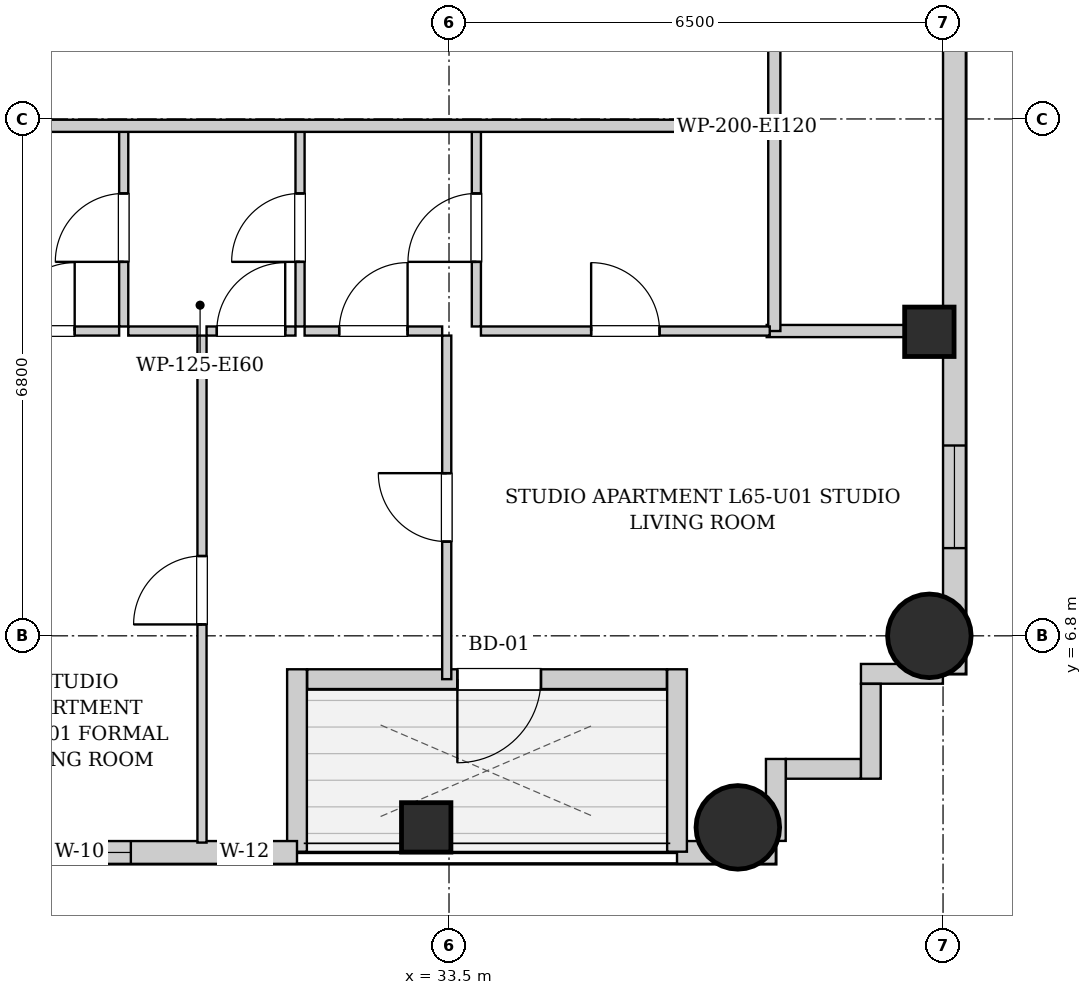
"""IFC4 building model, lengths in metres.
Left out: names, types, materials, properties, quantities, classifications, styles, units other than length and angle.
Written with IfcOpenShell. Run it as: python <this file> out.ifc"""

import sys

from ifc_helpers import new_model, si_unit, direction, frame, frame_2d, origin, origin_2d, place, context, subcontext, project, spatial, rectangle, circle, extrude, element, fill, save


model = new_model("IFC4")
c1 = context("Model", 3, precision=1e-05, world=origin(), true_north=direction((0.0, 1.0)))
c2 = subcontext(c1, "Body", "Model", "MODEL_VIEW")
j1 = project(units=[si_unit("LENGTHUNIT", "METRE"), si_unit("PLANEANGLEUNIT", "RADIAN")], contexts=[c1])
p1 = place(None, origin())
s1 = spatial("IfcSite", under=j1, at=p1, CompositionType="ELEMENT")
p2 = place(p1, origin())
s2 = spatial("IfcBuilding", under=s1, at=p2, CompositionType="ELEMENT")
p3 = place(p2, frame((0.0, 0.0, 224.1)))
s3 = spatial("IfcBuildingStorey", under=s2, at=p3, CompositionType="ELEMENT", Elevation=224.1)
p4 = place(p3, frame((33.2, 4.28, 0.0), z_axis=(0.0, 0.0, 1.0), x_axis=(1.0, 0.0, 0.0)))
e1 = element("IfcColumn", 1, at=p4, inside=s3, PredefinedType="COLUMN", context=c2, shape_type="SweptSolid", body=[
    extrude(rectangle(XDim=0.65, YDim=0.65, at=origin_2d()), origin(), (0.0, 0.0, 1.0), 3.4),
])
for number, where, z_axis, x_axis in (
    (2, (37.3, 4.28, 0.0), (0.0, 0.0, 1.0), (1.0, 0.0, 0.0)),
    (3, (39.82, 6.8, 0.0), (0.0, 0.0, 1.0), (1.0, 0.0, 0.0)),
):
    element("IfcColumn", number, at=place(p3, frame(where, z_axis=z_axis, x_axis=x_axis)), inside=s3, PredefinedType="COLUMN", context=c2, shape_type="SweptSolid", body=[
        extrude(circle(Radius=0.55, at=origin_2d()), origin(), (0.0, 0.0, 1.0), 3.4),
    ])
p5 = place(p3, frame((39.82, 10.8, 0.0), z_axis=(0.0, 0.0, 1.0), x_axis=(1.0, 0.0, 0.0)))
e4 = element("IfcColumn", 4, at=p5, inside=s3, PredefinedType="COLUMN", context=c2, shape_type="SweptSolid", body=[
    extrude(rectangle(XDim=0.65, YDim=0.65, at=origin_2d()), origin(), (0.0, 0.0, 1.0), 3.4),
])
p6 = place(p3, frame((40.15, 37.7, 0.0), z_axis=(0.0, 0.0, 1.0), x_axis=(0.0, -1.0, 0.0)))
e5 = element("IfcWall", 5, at=p6, inside=s3, PredefinedType="SOLIDWALL", context=c2, shape_type="SweptSolid", body=[
    extrude(rectangle(XDim=31.4, YDim=0.3, at=frame_2d((15.7, 0.0))), origin(), (0.0, 0.0, 1.0), 3.14),
])
p7 = place(p6, frame((28.396, 0.0, 0.55)))
e6 = element("IfcOpeningElement", 6, at=p7, cuts=e5, PredefinedType="OPENING", context=c2, shape_type="SweptSolid", body=[
    extrude(rectangle(XDim=1.35, YDim=1.2, at=frame_2d((0.675, 0.6))), frame((0.0, 0.16, 0.0), z_axis=(0.0, -1.0, 0.0), x_axis=(1.0, 0.0, 0.0)), (0.0, 0.0, 1.0), 0.32),
])
p8 = place(p6, frame((1.653, 0.0, 0.55)))
e7 = element("IfcOpeningElement", 7, at=p8, cuts=e5, PredefinedType="OPENING", context=c2, shape_type="SweptSolid", body=[
    extrude(rectangle(XDim=1.35, YDim=1.2, at=frame_2d((0.675, 0.6))), frame((0.0, 0.16, 0.0), z_axis=(0.0, -1.0, 0.0), x_axis=(1.0, 0.0, 0.0)), (0.0, 0.0, 1.0), 0.32),
])
p9 = place(p6, frame((19.683, 0.0, 0.55)))
e8 = element("IfcOpeningElement", 8, at=p9, cuts=e5, PredefinedType="OPENING", context=c2, shape_type="SweptSolid", body=[
    extrude(rectangle(XDim=1.35, YDim=1.2, at=frame_2d((0.675, 0.6))), frame((0.0, 0.16, 0.0), z_axis=(0.0, -1.0, 0.0), x_axis=(1.0, 0.0, 0.0)), (0.0, 0.0, 1.0), 0.32),
])
p10 = place(p6, frame((10.367, 0.0, 0.55)))
e9 = element("IfcOpeningElement", 9, at=p10, cuts=e5, PredefinedType="OPENING", context=c2, shape_type="SweptSolid", body=[
    extrude(rectangle(XDim=1.35, YDim=1.2, at=frame_2d((0.675, 0.6))), frame((0.0, 0.16, 0.0), z_axis=(0.0, -1.0, 0.0), x_axis=(1.0, 0.0, 0.0)), (0.0, 0.0, 1.0), 0.32),
])
p11 = place(p3, frame((37.8, 3.95, 0.0), z_axis=(0.0, 0.0, 1.0), x_axis=(-1.0, 0.0, 0.0)))
e10 = element("IfcWall", 10, at=p11, inside=s3, PredefinedType="SOLIDWALL", context=c2, shape_type="SweptSolid", body=[
    extrude(rectangle(XDim=1.3, YDim=0.3, at=frame_2d((0.65, 0.0))), origin(), (0.0, 0.0, 1.0), 3.14),
])
p12 = place(p3, frame((36.5, 3.96, 0.0), z_axis=(0.0, 0.0, 1.0), x_axis=(0.0, 1.0, 0.0)))
e11 = element("IfcWall", 11, at=p12, inside=s3, PredefinedType="SOLIDWALL", context=c2, shape_type="SweptSolid", body=[
    extrude(rectangle(XDim=2.4, YDim=0.26, at=frame_2d((1.2, 0.0))), origin(), (0.0, 0.0, 1.0), 3.14),
])
p13 = place(p3, frame((36.366, 6.23, 0.0), z_axis=(0.0, 0.0, 1.0), x_axis=(-1.0, 0.0, 0.0)))
e12 = element("IfcWall", 12, at=p13, inside=s3, PredefinedType="SOLIDWALL", context=c2, shape_type="SweptSolid", body=[
    extrude(rectangle(XDim=4.732, YDim=0.26, at=frame_2d((2.366, 0.0))), origin(), (0.0, 0.0, 1.0), 3.14),
])
p14 = place(p13, frame((1.656, 0.0, 0.0)))
e13 = element("IfcOpeningElement", 13, at=p14, cuts=e12, PredefinedType="OPENING", context=c2, shape_type="SweptSolid", body=[
    extrude(rectangle(XDim=1.1, YDim=2.0, at=frame_2d((0.55, 1.0))), frame((0.0, 0.14, 0.0), z_axis=(0.0, -1.0, 0.0), x_axis=(1.0, 0.0, 0.0)), (0.0, 0.0, 1.0), 0.28),
])
p15 = place(p3, frame((31.5, 6.36, 0.0), z_axis=(0.0, 0.0, 1.0), x_axis=(0.0, -1.0, 0.0)))
e14 = element("IfcWall", 14, at=p15, inside=s3, PredefinedType="SOLIDWALL", context=c2, shape_type="SweptSolid", body=[
    extrude(rectangle(XDim=2.4, YDim=0.26, at=frame_2d((1.2, 0.0))), origin(), (0.0, 0.0, 1.0), 3.14),
])
p16 = place(p3, frame((31.5, 3.95, 0.0), z_axis=(0.0, 0.0, 1.0), x_axis=(-1.0, 0.0, 0.0)))
e15 = element("IfcWall", 15, at=p16, inside=s3, PredefinedType="SOLIDWALL", context=c2, shape_type="SweptSolid", body=[
    extrude(rectangle(XDim=12.5, YDim=0.3, at=frame_2d((6.25, 0.0))), origin(), (0.0, 0.0, 1.0), 3.14),
])
p17 = place(p16, frame((11.171, 0.0, 0.55)))
e16 = element("IfcOpeningElement", 16, at=p17, cuts=e15, PredefinedType="OPENING", context=c2, shape_type="SweptSolid", body=[
    extrude(rectangle(XDim=0.85, YDim=1.2, at=frame_2d((0.425, 0.6))), frame((0.0, 0.16, 0.0), z_axis=(0.0, -1.0, 0.0), x_axis=(1.0, 0.0, 0.0)), (0.0, 0.0, 1.0), 0.32),
])
p18 = place(p16, frame((9.0, 0.0, 0.55)))
e17 = element("IfcOpeningElement", 17, at=p18, cuts=e15, PredefinedType="OPENING", context=c2, shape_type="SweptSolid", body=[
    extrude(rectangle(XDim=1.35, YDim=1.2, at=frame_2d((0.675, 0.6))), frame((0.0, 0.16, 0.0), z_axis=(0.0, -1.0, 0.0), x_axis=(1.0, 0.0, 0.0)), (0.0, 0.0, 1.0), 0.32),
])
p19 = place(p16, frame((2.186, 0.0, 0.55)))
e18 = element("IfcOpeningElement", 18, at=p19, cuts=e15, PredefinedType="OPENING", context=c2, shape_type="SweptSolid", body=[
    extrude(rectangle(XDim=1.35, YDim=1.2, at=frame_2d((0.675, 0.6))), frame((0.0, 0.16, 0.0), z_axis=(0.0, -1.0, 0.0), x_axis=(1.0, 0.0, 0.0)), (0.0, 0.0, 1.0), 0.32),
])
p20 = place(p16, frame((0.35, 0.0, 0.55)))
e19 = element("IfcOpeningElement", 19, at=p20, cuts=e15, PredefinedType="OPENING", context=c2, shape_type="SweptSolid", body=[
    extrude(rectangle(XDim=0.68, YDim=1.2, at=frame_2d((0.34, 0.6))), frame((0.0, 0.16, 0.0), z_axis=(0.0, -1.0, 0.0), x_axis=(1.0, 0.0, 0.0)), (0.0, 0.0, 1.0), 0.32),
])
p21 = place(p3, frame((39.998, 6.3, 0.0), z_axis=(0.0, 0.0, 1.0), x_axis=(-1.0, 0.0, 0.0)))
e20 = element("IfcWall", 20, at=p21, inside=s3, PredefinedType="SOLIDWALL", context=c2, shape_type="SweptSolid", body=[
    extrude(rectangle(XDim=1.078, YDim=0.26, at=frame_2d((0.539, 0.0))), origin(), (0.0, 0.0, 1.0), 3.14),
])
p22 = place(p3, frame((39.05, 6.168, 0.0), z_axis=(0.0, 0.0, 1.0), x_axis=(0.0, -1.0, 0.0)))
e21 = element("IfcWall", 21, at=p22, inside=s3, PredefinedType="SOLIDWALL", context=c2, shape_type="SweptSolid", body=[
    extrude(rectangle(XDim=1.248, YDim=0.26, at=frame_2d((0.624, 0.0))), origin(), (0.0, 0.0, 1.0), 3.14),
])
p23 = place(p3, frame((38.918, 5.05, 0.0), z_axis=(0.0, 0.0, 1.0), x_axis=(-1.0, 0.0, 0.0)))
e22 = element("IfcWall", 22, at=p23, inside=s3, PredefinedType="SOLIDWALL", context=c2, shape_type="SweptSolid", body=[
    extrude(rectangle(XDim=0.986, YDim=0.26, at=frame_2d((0.493, 0.0))), origin(), (0.0, 0.0, 1.0), 3.14),
])
p24 = place(p3, frame((37.8, 5.18, 0.0), z_axis=(0.0, 0.0, 1.0), x_axis=(0.0, -1.0, 0.0)))
e23 = element("IfcWall", 23, at=p24, inside=s3, PredefinedType="SOLIDWALL", context=c2, shape_type="SweptSolid", body=[
    extrude(rectangle(XDim=1.078, YDim=0.26, at=frame_2d((0.539, 0.0))), origin(), (0.0, 0.0, 1.0), 3.14),
])
p25 = place(p3, frame((37.78, 13.51, 0.0), z_axis=(0.0, 0.0, 1.0), x_axis=(0.0, 1.0, 0.0)))
e24 = element("IfcWall", 24, at=p25, inside=s3, PredefinedType="PARTITIONING", context=c2, shape_type="SweptSolid", body=[
    extrude(rectangle(XDim=1.58, YDim=0.16, at=frame_2d((0.79, 0.0))), origin(), (0.0, 0.0, 1.0), 3.14),
])
p26 = place(p3, frame((37.68, 10.81, 0.0), z_axis=(0.0, 0.0, 1.0), x_axis=(1.0, 0.0, 0.0)))
e25 = element("IfcWall", 25, at=p26, inside=s3, PredefinedType="PARTITIONING", context=c2, shape_type="SweptSolid", body=[
    extrude(rectangle(XDim=2.34, YDim=0.16, at=frame_2d((1.17, 0.0))), origin(), (0.0, 0.0, 1.0), 3.14),
])
p27 = place(p3, frame((37.78, 10.81, 0.0), z_axis=(0.0, 0.0, 1.0), x_axis=(0.0, 1.0, 0.0)))
e26 = element("IfcWall", 26, at=p27, inside=s3, PredefinedType="PARTITIONING", context=c2, shape_type="SweptSolid", body=[
    extrude(rectangle(XDim=2.66, YDim=0.16, at=frame_2d((1.33, 0.0))), origin(), (0.0, 0.0, 1.0), 3.14),
])
p28 = place(p3, frame((29.22, 10.87, 0.0), z_axis=(0.0, 0.0, 1.0), x_axis=(0.0, 1.0, 0.0)))
e27 = element("IfcWall", 27, at=p28, inside=s3, PredefinedType="PARTITIONING", context=c2, shape_type="SweptSolid", body=[
    extrude(rectangle(XDim=2.6, YDim=0.12, at=frame_2d((1.3, 0.0))), origin(), (0.0, 0.0, 1.0), 3.14),
])
p29 = place(p28, frame((0.85, 0.0, 0.0)))
e28 = element("IfcOpeningElement", 28, at=p29, cuts=e27, PredefinedType="OPENING", context=c2, shape_type="SweptSolid", body=[
    extrude(rectangle(XDim=0.9, YDim=2.05, at=frame_2d((0.45, 1.025))), frame((0.0, 0.07, 0.0), z_axis=(0.0, -1.0, 0.0), x_axis=(1.0, 0.0, 0.0)), (0.0, 0.0, 1.0), 0.14),
])
p30 = place(p3, frame((27.09, 10.81, 0.0), z_axis=(0.0, 0.0, 1.0), x_axis=(1.0, 0.0, 0.0)))
e29 = element("IfcWall", 29, at=p30, inside=s3, PredefinedType="PARTITIONING", context=c2, shape_type="SweptSolid", body=[
    extrude(rectangle(XDim=2.07, YDim=0.12, at=frame_2d((1.035, 0.0))), origin(), (0.0, 0.0, 1.0), 3.14),
])
p31 = place(p30, frame((0.585, 0.0, 0.0)))
e30 = element("IfcOpeningElement", 30, at=p31, cuts=e29, PredefinedType="OPENING", context=c2, shape_type="SweptSolid", body=[
    extrude(rectangle(XDim=0.9, YDim=2.05, at=frame_2d((0.45, 1.025))), frame((0.0, 0.07, 0.0), z_axis=(0.0, -1.0, 0.0), x_axis=(1.0, 0.0, 0.0)), (0.0, 0.0, 1.0), 0.14),
])
p32 = place(p3, frame((31.54, 10.87, 0.0), z_axis=(0.0, 0.0, 1.0), x_axis=(0.0, 1.0, 0.0)))
e31 = element("IfcWall", 31, at=p32, inside=s3, PredefinedType="PARTITIONING", context=c2, shape_type="SweptSolid", body=[
    extrude(rectangle(XDim=2.6, YDim=0.12, at=frame_2d((1.3, 0.0))), origin(), (0.0, 0.0, 1.0), 3.14),
])
p33 = place(p32, frame((0.85, 0.0, 0.0)))
e32 = element("IfcOpeningElement", 32, at=p33, cuts=e31, PredefinedType="OPENING", context=c2, shape_type="SweptSolid", body=[
    extrude(rectangle(XDim=0.9, YDim=2.05, at=frame_2d((0.45, 1.025))), frame((0.0, 0.07, 0.0), z_axis=(0.0, -1.0, 0.0), x_axis=(1.0, 0.0, 0.0)), (0.0, 0.0, 1.0), 0.14),
])
p34 = place(p3, frame((29.28, 10.81, 0.0), z_axis=(0.0, 0.0, 1.0), x_axis=(1.0, 0.0, 0.0)))
e33 = element("IfcWall", 33, at=p34, inside=s3, PredefinedType="PARTITIONING", context=c2, shape_type="SweptSolid", body=[
    extrude(rectangle(XDim=0.91, YDim=0.12, at=frame_2d((0.455, 0.0))), origin(), (0.0, 0.0, 1.0), 3.14),
])
p35 = place(p3, frame((30.31, 10.81, 0.0), z_axis=(0.0, 0.0, 1.0), x_axis=(1.0, 0.0, 0.0)))
e34 = element("IfcWall", 34, at=p35, inside=s3, PredefinedType="PARTITIONING", context=c2, shape_type="SweptSolid", body=[
    extrude(rectangle(XDim=1.17, YDim=0.12, at=frame_2d((0.585, 0.0))), origin(), (0.0, 0.0, 1.0), 3.14),
])
p36 = place(p35, frame((0.135, 0.0, 0.0)))
e35 = element("IfcOpeningElement", 35, at=p36, cuts=e34, PredefinedType="OPENING", context=c2, shape_type="SweptSolid", body=[
    extrude(rectangle(XDim=0.9, YDim=2.05, at=frame_2d((0.45, 1.025))), frame((0.0, 0.07, 0.0), z_axis=(0.0, -1.0, 0.0), x_axis=(1.0, 0.0, 0.0)), (0.0, 0.0, 1.0), 0.14),
])
p37 = place(p3, frame((33.86, 10.87, 0.0), z_axis=(0.0, 0.0, 1.0), x_axis=(0.0, 1.0, 0.0)))
e36 = element("IfcWall", 36, at=p37, inside=s3, PredefinedType="PARTITIONING", context=c2, shape_type="SweptSolid", body=[
    extrude(rectangle(XDim=2.6, YDim=0.12, at=frame_2d((1.3, 0.0))), origin(), (0.0, 0.0, 1.0), 3.14),
])
p38 = place(p37, frame((0.85, 0.0, 0.0)))
e37 = element("IfcOpeningElement", 37, at=p38, cuts=e36, PredefinedType="OPENING", context=c2, shape_type="SweptSolid", body=[
    extrude(rectangle(XDim=0.9, YDim=2.05, at=frame_2d((0.45, 1.025))), frame((0.0, 0.07, 0.0), z_axis=(0.0, -1.0, 0.0), x_axis=(1.0, 0.0, 0.0)), (0.0, 0.0, 1.0), 0.14),
])
p39 = place(p3, frame((31.6, 10.81, 0.0), z_axis=(0.0, 0.0, 1.0), x_axis=(1.0, 0.0, 0.0)))
e38 = element("IfcWall", 38, at=p39, inside=s3, PredefinedType="PARTITIONING", context=c2, shape_type="SweptSolid", body=[
    extrude(rectangle(XDim=1.81, YDim=0.12, at=frame_2d((0.905, 0.0))), origin(), (0.0, 0.0, 1.0), 3.14),
])
p40 = place(p39, frame((0.455, 0.0, 0.0)))
e39 = element("IfcOpeningElement", 39, at=p40, cuts=e38, PredefinedType="OPENING", context=c2, shape_type="SweptSolid", body=[
    extrude(rectangle(XDim=0.9, YDim=2.05, at=frame_2d((0.45, 1.025))), frame((0.0, 0.07, 0.0), z_axis=(0.0, -1.0, 0.0), x_axis=(1.0, 0.0, 0.0)), (0.0, 0.0, 1.0), 0.14),
])
p41 = place(p3, frame((33.92, 10.81, 0.0), z_axis=(0.0, 0.0, 1.0), x_axis=(1.0, 0.0, 0.0)))
e40 = element("IfcWall", 40, at=p41, inside=s3, PredefinedType="PARTITIONING", context=c2, shape_type="SweptSolid", body=[
    extrude(rectangle(XDim=3.8, YDim=0.12, at=frame_2d((1.9, 0.0))), origin(), (0.0, 0.0, 1.0), 3.14),
])
p42 = place(p41, frame((1.45, 0.0, 0.0)))
e41 = element("IfcOpeningElement", 41, at=p42, cuts=e40, PredefinedType="OPENING", context=c2, shape_type="SweptSolid", body=[
    extrude(rectangle(XDim=0.9, YDim=2.05, at=frame_2d((0.45, 1.025))), frame((0.0, 0.07, 0.0), z_axis=(0.0, -1.0, 0.0), x_axis=(1.0, 0.0, 0.0)), (0.0, 0.0, 1.0), 0.14),
])
p43 = place(p3, frame((30.25, 4.08, 0.0), z_axis=(0.0, 0.0, 1.0), x_axis=(0.0, 1.0, 0.0)))
e42 = element("IfcWall", 42, at=p43, inside=s3, PredefinedType="PARTITIONING", context=c2, shape_type="SweptSolid", body=[
    extrude(rectangle(XDim=6.67, YDim=0.12, at=frame_2d((3.335, 0.0))), origin(), (0.0, 0.0, 1.0), 3.14),
])
p44 = place(p43, frame((2.87, 0.0, 0.0)))
e43 = element("IfcOpeningElement", 43, at=p44, cuts=e42, PredefinedType="OPENING", context=c2, shape_type="SweptSolid", body=[
    extrude(rectangle(XDim=0.9, YDim=2.05, at=frame_2d((0.45, 1.025))), frame((0.0, 0.07, 0.0), z_axis=(0.0, -1.0, 0.0), x_axis=(1.0, 0.0, 0.0)), (0.0, 0.0, 1.0), 0.14),
])
p45 = place(p3, frame((33.47, 6.23, 0.0), z_axis=(0.0, 0.0, 1.0), x_axis=(0.0, 1.0, 0.0)))
e44 = element("IfcWall", 44, at=p45, inside=s3, PredefinedType="PARTITIONING", context=c2, shape_type="SweptSolid", body=[
    extrude(rectangle(XDim=4.52, YDim=0.12, at=frame_2d((2.26, 0.0))), origin(), (0.0, 0.0, 1.0), 3.14),
])
p46 = place(p45, frame((1.81, 0.0, 0.0)))
e45 = element("IfcOpeningElement", 45, at=p46, cuts=e44, PredefinedType="OPENING", context=c2, shape_type="SweptSolid", body=[
    extrude(rectangle(XDim=0.9, YDim=2.05, at=frame_2d((0.45, 1.025))), frame((0.0, 0.07, 0.0), z_axis=(0.0, -1.0, 0.0), x_axis=(1.0, 0.0, 0.0)), (0.0, 0.0, 1.0), 0.14),
])
p47 = place(p3, frame((13.15, 13.51, 0.0), z_axis=(0.0, 0.0, 1.0), x_axis=(1.0, 0.0, 0.0)))
e46 = element("IfcWall", 46, at=p47, inside=s3, PredefinedType="PARTITIONING", context=c2, shape_type="SweptSolid", body=[
    extrude(rectangle(XDim=24.6, YDim=0.16, at=frame_2d((12.3, 0.0))), origin(), (0.0, 0.0, 1.0), 3.14),
])
p48 = place(p47, frame((3.165, 0.0, 0.0)))
e47 = element("IfcOpeningElement", 47, at=p48, cuts=e46, PredefinedType="OPENING", context=c2, shape_type="SweptSolid", body=[
    extrude(rectangle(XDim=0.95, YDim=2.1, at=frame_2d((0.475, 1.05))), frame((0.0, 0.09, 0.0), z_axis=(0.0, -1.0, 0.0), x_axis=(1.0, 0.0, 0.0)), (0.0, 0.0, 1.0), 0.18),
])
p49 = place(p29, origin())
e48 = element("IfcDoor", 48, at=p49, inside=s3, OperationType="SINGLE_SWING_LEFT", PredefinedType="DOOR", context=c2, shape_type="SweptSolid", body=[
    extrude(rectangle(XDim=0.9, YDim=2.05, at=frame_2d((0.45, 1.025))), frame((0.0, 0.025, 0.0), z_axis=(0.0, -1.0, 0.0), x_axis=(1.0, 0.0, 0.0)), (0.0, 0.0, 1.0), 0.05),
])
fill(e28, e48)
p50 = place(p31, origin())
e49 = element("IfcDoor", 49, at=p50, inside=s3, OperationType="SINGLE_SWING_RIGHT", PredefinedType="DOOR", context=c2, shape_type="SweptSolid", body=[
    extrude(rectangle(XDim=0.9, YDim=2.05, at=frame_2d((0.45, 1.025))), frame((0.0, 0.025, 0.0), z_axis=(0.0, -1.0, 0.0), x_axis=(1.0, 0.0, 0.0)), (0.0, 0.0, 1.0), 0.05),
])
fill(e30, e49)
p51 = place(p33, origin())
e50 = element("IfcDoor", 50, at=p51, inside=s3, OperationType="SINGLE_SWING_LEFT", PredefinedType="DOOR", context=c2, shape_type="SweptSolid", body=[
    extrude(rectangle(XDim=0.9, YDim=2.05, at=frame_2d((0.45, 1.025))), frame((0.0, 0.025, 0.0), z_axis=(0.0, -1.0, 0.0), x_axis=(1.0, 0.0, 0.0)), (0.0, 0.0, 1.0), 0.05),
])
fill(e32, e50)
p52 = place(p36, origin())
e51 = element("IfcDoor", 51, at=p52, inside=s3, OperationType="SINGLE_SWING_RIGHT", PredefinedType="DOOR", context=c2, shape_type="SweptSolid", body=[
    extrude(rectangle(XDim=0.9, YDim=2.05, at=frame_2d((0.45, 1.025))), frame((0.0, 0.025, 0.0), z_axis=(0.0, -1.0, 0.0), x_axis=(1.0, 0.0, 0.0)), (0.0, 0.0, 1.0), 0.05),
])
fill(e35, e51)
p53 = place(p38, origin())
e52 = element("IfcDoor", 52, at=p53, inside=s3, OperationType="SINGLE_SWING_LEFT", PredefinedType="DOOR", context=c2, shape_type="SweptSolid", body=[
    extrude(rectangle(XDim=0.9, YDim=2.05, at=frame_2d((0.45, 1.025))), frame((0.0, 0.025, 0.0), z_axis=(0.0, -1.0, 0.0), x_axis=(1.0, 0.0, 0.0)), (0.0, 0.0, 1.0), 0.05),
])
fill(e37, e52)
p54 = place(p40, origin())
e53 = element("IfcDoor", 53, at=p54, inside=s3, OperationType="SINGLE_SWING_RIGHT", PredefinedType="DOOR", context=c2, shape_type="SweptSolid", body=[
    extrude(rectangle(XDim=0.9, YDim=2.05, at=frame_2d((0.45, 1.025))), frame((0.0, 0.025, 0.0), z_axis=(0.0, -1.0, 0.0), x_axis=(1.0, 0.0, 0.0)), (0.0, 0.0, 1.0), 0.05),
])
fill(e39, e53)
p55 = place(p42, origin())
e54 = element("IfcDoor", 54, at=p55, inside=s3, OperationType="SINGLE_SWING_LEFT", PredefinedType="DOOR", context=c2, shape_type="SweptSolid", body=[
    extrude(rectangle(XDim=0.9, YDim=2.05, at=frame_2d((0.45, 1.025))), frame((0.0, 0.025, 0.0), z_axis=(0.0, -1.0, 0.0), x_axis=(1.0, 0.0, 0.0)), (0.0, 0.0, 1.0), 0.05),
])
fill(e41, e54)
p56 = place(p44, origin())
e55 = element("IfcDoor", 55, at=p56, inside=s3, OperationType="SINGLE_SWING_LEFT", PredefinedType="DOOR", context=c2, shape_type="SweptSolid", body=[
    extrude(rectangle(XDim=0.9, YDim=2.05, at=frame_2d((0.45, 1.025))), frame((0.0, 0.025, 0.0), z_axis=(0.0, -1.0, 0.0), x_axis=(1.0, 0.0, 0.0)), (0.0, 0.0, 1.0), 0.05),
])
fill(e43, e55)
p57 = place(p46, origin())
e56 = element("IfcDoor", 56, at=p57, inside=s3, OperationType="SINGLE_SWING_RIGHT", PredefinedType="DOOR", context=c2, shape_type="SweptSolid", body=[
    extrude(rectangle(XDim=0.9, YDim=2.05, at=frame_2d((0.45, 1.025))), frame((0.0, 0.025, 0.0), z_axis=(0.0, -1.0, 0.0), x_axis=(1.0, 0.0, 0.0)), (0.0, 0.0, 1.0), 0.05),
])
fill(e45, e56)
p58 = place(p14, origin())
e57 = element("IfcDoor", 57, at=p58, inside=s3, OperationType="SINGLE_SWING_RIGHT", PredefinedType="DOOR", context=c2, shape_type="SweptSolid", body=[
    extrude(rectangle(XDim=1.1, YDim=2.0, at=frame_2d((0.55, 1.0))), frame((0.0, 0.025, 0.0), z_axis=(0.0, -1.0, 0.0), x_axis=(1.0, 0.0, 0.0)), (0.0, 0.0, 1.0), 0.05),
])
fill(e13, e57)
p59 = place(p19, origin())
e58 = element("IfcWindow", 58, at=p59, inside=s3, PartitioningType="SINGLE_PANEL", PredefinedType="WINDOW", context=c2, shape_type="SweptSolid", body=[
    extrude(rectangle(XDim=1.35, YDim=1.2, at=frame_2d((0.675, 0.6))), frame((0.0, 0.03, 0.0), z_axis=(0.0, -1.0, 0.0), x_axis=(1.0, 0.0, 0.0)), (0.0, 0.0, 1.0), 0.06),
])
fill(e18, e58)
p60 = place(p20, origin())
e59 = element("IfcWindow", 59, at=p60, inside=s3, PartitioningType="SINGLE_PANEL", PredefinedType="WINDOW", context=c2, shape_type="SweptSolid", body=[
    extrude(rectangle(XDim=0.68, YDim=1.2, at=frame_2d((0.34, 0.6))), frame((0.0, 0.03, 0.0), z_axis=(0.0, -1.0, 0.0), x_axis=(1.0, 0.0, 0.0)), (0.0, 0.0, 1.0), 0.06),
])
fill(e19, e59)
p61 = place(p7, origin())
e60 = element("IfcWindow", 60, at=p61, inside=s3, PartitioningType="SINGLE_PANEL", PredefinedType="WINDOW", context=c2, shape_type="SweptSolid", body=[
    extrude(rectangle(XDim=1.35, YDim=1.2, at=frame_2d((0.675, 0.6))), frame((0.0, 0.03, 0.0), z_axis=(0.0, -1.0, 0.0), x_axis=(1.0, 0.0, 0.0)), (0.0, 0.0, 1.0), 0.06),
])
fill(e6, e60)
save(model, sys.argv[1])
